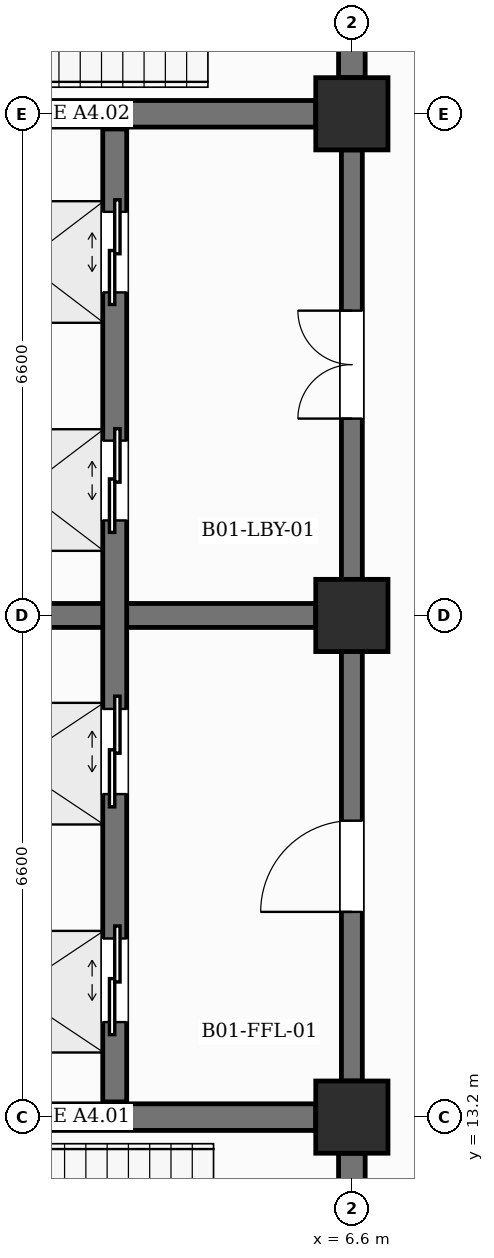
"""IFC4 building model, lengths in metres.
Left out: names, types, materials, properties, quantities, classifications, styles, units other than length and angle.
Written with IfcOpenShell. Run it as: python <this file> out.ifc"""

import sys

from ifc_helpers import new_model, si_unit, direction, frame, frame_2d, origin, origin_2d, place, context, subcontext, project, spatial, rectangle, extrude, element, fill, save


model = new_model("IFC4")
c1 = context("Model", 3, precision=1e-05, world=origin(), true_north=direction((0.0, 1.0)))
c2 = subcontext(c1, "Body", "Model", "MODEL_VIEW")
j1 = project(units=[si_unit("LENGTHUNIT", "METRE"), si_unit("PLANEANGLEUNIT", "RADIAN")], contexts=[c1])
p1 = place(None, origin())
s1 = spatial("IfcSite", under=j1, at=p1, CompositionType="ELEMENT")
p2 = place(p1, origin())
s2 = spatial("IfcBuilding", under=s1, at=p2, CompositionType="ELEMENT")
p3 = place(p2, frame((0.0, 0.0, -4.5)))
s3 = spatial("IfcBuildingStorey", under=s2, at=p3, CompositionType="ELEMENT", Elevation=-4.5)
for number, where, z_axis, x_axis in (
    (1, (6.6, 13.2, 0.0), (0.0, 0.0, 1.0), (1.0, 0.0, 0.0)),
    (2, (6.6, 19.8, 0.0), (0.0, 0.0, 1.0), (1.0, 0.0, 0.0)),
    (3, (6.6, 26.4, 0.0), (0.0, 0.0, 1.0), (1.0, 0.0, 0.0)),
):
    element("IfcColumn", number, at=place(p3, frame(where, z_axis=z_axis, x_axis=x_axis)), inside=s3, PredefinedType="COLUMN", context=c2, shape_type="SweptSolid", body=[
        extrude(rectangle(XDim=0.95, YDim=0.95, at=origin_2d()), origin(), (0.0, 0.0, 1.0), 4.5),
    ])
p4 = place(p3, frame((0.475, 13.2, 0.0), z_axis=(0.0, 0.0, 1.0), x_axis=(1.0, 0.0, 0.0)))
e4 = element("IfcWall", 4, at=p4, inside=s3, PredefinedType="SHEAR", context=c2, shape_type="SweptSolid", body=[
    extrude(rectangle(XDim=5.65, YDim=0.35, at=frame_2d((2.825, 0.0))), origin(), (0.0, 0.0, 1.0), 3.24),
])
p5 = place(p3, frame((6.6, 7.075, 0.0), z_axis=(0.0, 0.0, 1.0), x_axis=(0.0, 1.0, 0.0)))
e5 = element("IfcWall", 5, at=p5, inside=s3, PredefinedType="SHEAR", context=c2, shape_type="SweptSolid", body=[
    extrude(rectangle(XDim=5.65, YDim=0.35, at=frame_2d((2.825, 0.0))), origin(), (0.0, 0.0, 1.0), 3.34),
])
p6 = place(p5, frame((2.275, 0.0, 0.0)))
e6 = element("IfcOpeningElement", 6, at=p6, cuts=e5, PredefinedType="OPENING", context=c2, shape_type="SweptSolid", body=[
    extrude(rectangle(XDim=1.1, YDim=2.15, at=frame_2d((0.55, 1.075))), frame((0.0, 0.185, 0.0), z_axis=(0.0, -1.0, 0.0), x_axis=(1.0, 0.0, 0.0)), (0.0, 0.0, 1.0), 0.37),
])
p7 = place(p3, frame((0.475, 26.4, 0.0), z_axis=(0.0, 0.0, 1.0), x_axis=(1.0, 0.0, 0.0)))
e7 = element("IfcWall", 7, at=p7, inside=s3, PredefinedType="SHEAR", context=c2, shape_type="SweptSolid", body=[
    extrude(rectangle(XDim=5.65, YDim=0.35, at=frame_2d((2.825, 0.0))), origin(), (0.0, 0.0, 1.0), 3.24),
])
p8 = place(p3, frame((6.6, 26.875, 0.0), z_axis=(0.0, 0.0, 1.0), x_axis=(0.0, 1.0, 0.0)))
e8 = element("IfcWall", 8, at=p8, inside=s3, PredefinedType="SHEAR", context=c2, shape_type="SweptSolid", body=[
    extrude(rectangle(XDim=5.65, YDim=0.35, at=frame_2d((2.825, 0.0))), origin(), (0.0, 0.0, 1.0), 3.34),
])
p9 = place(p8, frame((2.275, 0.0, 0.0)))
e9 = element("IfcOpeningElement", 9, at=p9, cuts=e8, PredefinedType="OPENING", context=c2, shape_type="SweptSolid", body=[
    extrude(rectangle(XDim=1.1, YDim=2.15, at=frame_2d((0.55, 1.075))), frame((0.0, 0.185, 0.0), z_axis=(0.0, -1.0, 0.0), x_axis=(1.0, 0.0, 0.0)), (0.0, 0.0, 1.0), 0.37),
])
p10 = place(p3, frame((0.475, 19.8, 0.0), z_axis=(0.0, 0.0, 1.0), x_axis=(1.0, 0.0, 0.0)))
e10 = element("IfcWall", 10, at=p10, inside=s3, PredefinedType="SHEAR", context=c2, shape_type="SweptSolid", body=[
    extrude(rectangle(XDim=5.65, YDim=0.315, at=frame_2d((2.825, 0.0))), origin(), (0.0, 0.0, 1.0), 3.34),
])
p11 = place(p3, frame((6.6, 13.675, 0.0), z_axis=(0.0, 0.0, 1.0), x_axis=(0.0, 1.0, 0.0)))
e11 = element("IfcWall", 11, at=p11, inside=s3, PredefinedType="SHEAR", context=c2, shape_type="SweptSolid", body=[
    extrude(rectangle(XDim=5.65, YDim=0.275, at=frame_2d((2.825, 0.0))), origin(), (0.0, 0.0, 1.0), 3.34),
])
p12 = place(p11, frame((2.225, 0.0, 0.0)))
e12 = element("IfcOpeningElement", 12, at=p12, cuts=e11, PredefinedType="OPENING", context=c2, shape_type="SweptSolid", body=[
    extrude(rectangle(XDim=1.2, YDim=2.25, at=frame_2d((0.6, 1.125))), frame((0.0, 0.147, 0.0), z_axis=(0.0, -1.0, 0.0), x_axis=(1.0, 0.0, 0.0)), (0.0, 0.0, 1.0), 0.295),
])
p13 = place(p3, frame((6.6, 20.275, 0.0), z_axis=(0.0, 0.0, 1.0), x_axis=(0.0, 1.0, 0.0)))
e13 = element("IfcWall", 13, at=p13, inside=s3, PredefinedType="SHEAR", context=c2, shape_type="SweptSolid", body=[
    extrude(rectangle(XDim=5.65, YDim=0.275, at=frame_2d((2.825, 0.0))), origin(), (0.0, 0.0, 1.0), 3.34),
])
p14 = place(p13, frame((2.115, 0.0, 0.0)))
e14 = element("IfcOpeningElement", 14, at=p14, cuts=e13, PredefinedType="OPENING", context=c2, shape_type="SweptSolid", body=[
    extrude(rectangle(XDim=1.42, YDim=2.2, at=frame_2d((0.71, 1.1))), frame((0.0, 0.147, 0.0), z_axis=(0.0, -1.0, 0.0), x_axis=(1.0, 0.0, 0.0)), (0.0, 0.0, 1.0), 0.295),
])
p15 = place(p3, frame((3.48, 13.4, 0.0), z_axis=(0.0, 0.0, 1.0), x_axis=(0.0, 1.0, 0.0)))
e15 = element("IfcWall", 15, at=p15, inside=s3, PredefinedType="SHEAR", context=c2, shape_type="SweptSolid", body=[
    extrude(rectangle(XDim=6.2, YDim=0.315, at=frame_2d((3.1, 0.0))), origin(), (0.0, 0.0, 1.0), 4.09),
])
p16 = place(p15, frame((1.05, 0.0, 0.0)))
e16 = element("IfcOpeningElement", 16, at=p16, cuts=e15, PredefinedType="OPENING", context=c2, shape_type="SweptSolid", body=[
    extrude(rectangle(XDim=1.1, YDim=2.15, at=frame_2d((0.55, 1.075))), frame((0.0, 0.167, 0.0), z_axis=(0.0, -1.0, 0.0), x_axis=(1.0, 0.0, 0.0)), (0.0, 0.0, 1.0), 0.335),
])
p17 = place(p15, frame((4.05, 0.0, 0.0)))
e17 = element("IfcOpeningElement", 17, at=p17, cuts=e15, PredefinedType="OPENING", context=c2, shape_type="SweptSolid", body=[
    extrude(rectangle(XDim=1.12, YDim=2.15, at=frame_2d((0.56, 1.075))), frame((0.0, 0.167, 0.0), z_axis=(0.0, -1.0, 0.0), x_axis=(1.0, 0.0, 0.0)), (0.0, 0.0, 1.0), 0.335),
])
p18 = place(p3, frame((3.48, 20.0, 0.0), z_axis=(0.0, 0.0, 1.0), x_axis=(0.0, 1.0, 0.0)))
e18 = element("IfcWall", 18, at=p18, inside=s3, PredefinedType="SHEAR", context=c2, shape_type="SweptSolid", body=[
    extrude(rectangle(XDim=6.2, YDim=0.315, at=frame_2d((3.1, 0.0))), origin(), (0.0, 0.0, 1.0), 4.09),
])
p19 = place(p18, frame((1.05, 0.0, 0.0)))
e19 = element("IfcOpeningElement", 19, at=p19, cuts=e18, PredefinedType="OPENING", context=c2, shape_type="SweptSolid", body=[
    extrude(rectangle(XDim=1.05, YDim=2.15, at=frame_2d((0.525, 1.075))), frame((0.0, 0.167, 0.0), z_axis=(0.0, -1.0, 0.0), x_axis=(1.0, 0.0, 0.0)), (0.0, 0.0, 1.0), 0.335),
])
p20 = place(p18, frame((4.05, 0.0, 0.0)))
e20 = element("IfcOpeningElement", 20, at=p20, cuts=e18, PredefinedType="OPENING", context=c2, shape_type="SweptSolid", body=[
    extrude(rectangle(XDim=1.06, YDim=2.15, at=frame_2d((0.53, 1.075))), frame((0.0, 0.167, 0.0), z_axis=(0.0, -1.0, 0.0), x_axis=(1.0, 0.0, 0.0)), (0.0, 0.0, 1.0), 0.335),
])
p21 = place(p16, origin())
e21 = element("IfcDoor", 21, at=p21, inside=s3, OperationType="DOUBLE_DOOR_SLIDING", PredefinedType="USERDEFINED", context=c2, shape_type="SweptSolid", body=[
    extrude(rectangle(XDim=1.1, YDim=2.15, at=frame_2d((0.55, 1.075))), frame((0.0, 0.025, 0.0), z_axis=(0.0, -1.0, 0.0), x_axis=(1.0, 0.0, 0.0)), (0.0, 0.0, 1.0), 0.05),
])
fill(e16, e21)
p22 = place(p17, origin())
e22 = element("IfcDoor", 22, at=p22, inside=s3, OperationType="DOUBLE_DOOR_SLIDING", PredefinedType="USERDEFINED", context=c2, shape_type="SweptSolid", body=[
    extrude(rectangle(XDim=1.12, YDim=2.15, at=frame_2d((0.56, 1.075))), frame((0.0, 0.025, 0.0), z_axis=(0.0, -1.0, 0.0), x_axis=(1.0, 0.0, 0.0)), (0.0, 0.0, 1.0), 0.05),
])
fill(e17, e22)
p23 = place(p19, origin())
e23 = element("IfcDoor", 23, at=p23, inside=s3, OperationType="DOUBLE_DOOR_SLIDING", PredefinedType="USERDEFINED", context=c2, shape_type="SweptSolid", body=[
    extrude(rectangle(XDim=1.05, YDim=2.15, at=frame_2d((0.525, 1.075))), frame((0.0, 0.025, 0.0), z_axis=(0.0, -1.0, 0.0), x_axis=(1.0, 0.0, 0.0)), (0.0, 0.0, 1.0), 0.05),
])
fill(e19, e23)
p24 = place(p20, origin())
e24 = element("IfcDoor", 24, at=p24, inside=s3, OperationType="DOUBLE_DOOR_SLIDING", PredefinedType="USERDEFINED", context=c2, shape_type="SweptSolid", body=[
    extrude(rectangle(XDim=1.06, YDim=2.15, at=frame_2d((0.53, 1.075))), frame((0.0, 0.025, 0.0), z_axis=(0.0, -1.0, 0.0), x_axis=(1.0, 0.0, 0.0)), (0.0, 0.0, 1.0), 0.05),
])
fill(e20, e24)
p25 = place(p12, origin())
e25 = element("IfcDoor", 25, at=p25, inside=s3, OperationType="SINGLE_SWING_LEFT", PredefinedType="DOOR", context=c2, shape_type="SweptSolid", body=[
    extrude(rectangle(XDim=1.2, YDim=2.25, at=frame_2d((0.6, 1.125))), frame((0.0, 0.025, 0.0), z_axis=(0.0, -1.0, 0.0), x_axis=(1.0, 0.0, 0.0)), (0.0, 0.0, 1.0), 0.05),
])
fill(e12, e25)
p26 = place(p14, origin())
e26 = element("IfcDoor", 26, at=p26, inside=s3, OperationType="DOUBLE_DOOR_SINGLE_SWING", PredefinedType="DOOR", context=c2, shape_type="SweptSolid", body=[
    extrude(rectangle(XDim=1.42, YDim=2.2, at=frame_2d((0.71, 1.1))), frame((0.0, 0.025, 0.0), z_axis=(0.0, -1.0, 0.0), x_axis=(1.0, 0.0, 0.0)), (0.0, 0.0, 1.0), 0.05),
])
fill(e14, e26)
save(model, sys.argv[1])
